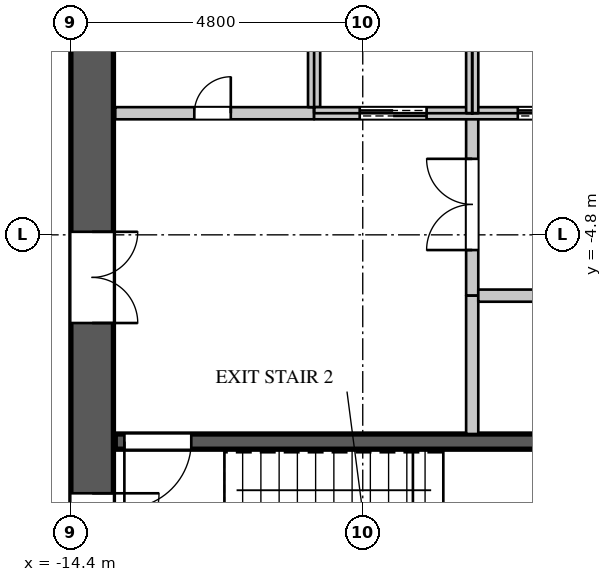
"""IFC4 building model, lengths in metres.
Left out: names, types, materials, properties, quantities, classifications, styles, units other than length and angle.
Written with IfcOpenShell. Run it as: python <this file> out.ifc"""

import sys

from ifc_helpers import new_model, si_unit, direction, frame, frame_2d, origin, place, context, subcontext, project, spatial, rectangle, extrude, element, fill, save


model = new_model("IFC4")
c1 = context("Model", 3, precision=1e-05, world=origin(), true_north=direction((0.0, 1.0)))
c2 = subcontext(c1, "Body", "Model", "MODEL_VIEW")
j1 = project(units=[si_unit("LENGTHUNIT", "METRE"), si_unit("PLANEANGLEUNIT", "RADIAN")], contexts=[c1])
p1 = place(None, origin())
s1 = spatial("IfcSite", under=j1, at=p1, CompositionType="ELEMENT")
p2 = place(p1, origin())
s2 = spatial("IfcBuilding", under=s1, at=p2, CompositionType="ELEMENT")
p3 = place(p2, frame((0.0, 0.0, 174.9)))
s3 = spatial("IfcBuildingStorey", under=s2, at=p3, CompositionType="ELEMENT", Elevation=174.9)
p4 = place(p3, frame((-14.05, -11.3, 0.0), z_axis=(0.0, 0.0, 1.0), x_axis=(0.0, 1.0, 0.0)))
e1 = element("IfcWall", 1, at=p4, inside=s3, PredefinedType="SHEAR", context=c2, shape_type="SweptSolid", body=[
    extrude(rectangle(XDim=22.6, YDim=0.7, at=frame_2d((11.3, 0.0))), origin(), (0.0, 0.0, 1.0), 4.2),
])
p5 = place(p4, frame((20.35, 0.0, 0.0)))
e2 = element("IfcOpeningElement", 2, at=p5, cuts=e1, PredefinedType="OPENING", context=c2, shape_type="SweptSolid", body=[
    extrude(rectangle(XDim=1.1, YDim=2.2, at=frame_2d((0.55, 1.1))), frame((0.0, 0.36, 0.0), z_axis=(0.0, -1.0, 0.0), x_axis=(1.0, 0.0, 0.0)), (0.0, 0.0, 1.0), 0.72),
])
p6 = place(p4, frame((1.15, 0.0, 0.0)))
e3 = element("IfcOpeningElement", 3, at=p6, cuts=e1, PredefinedType="OPENING", context=c2, shape_type="SweptSolid", body=[
    extrude(rectangle(XDim=1.1, YDim=2.2, at=frame_2d((0.55, 1.1))), frame((0.0, 0.36, 0.0), z_axis=(0.0, -1.0, 0.0), x_axis=(1.0, 0.0, 0.0)), (0.0, 0.0, 1.0), 0.72),
])
p7 = place(p4, frame((16.05, 0.0, 0.0)))
e4 = element("IfcOpeningElement", 4, at=p7, cuts=e1, PredefinedType="OPENING", context=c2, shape_type="SweptSolid", body=[
    extrude(rectangle(XDim=1.5, YDim=2.4, at=frame_2d((0.75, 1.2))), frame((0.0, 0.36, 0.0), z_axis=(0.0, -1.0, 0.0), x_axis=(1.0, 0.0, 0.0)), (0.0, 0.0, 1.0), 0.72),
])
p8 = place(p4, frame((5.05, 0.0, 0.0)))
e5 = element("IfcOpeningElement", 5, at=p8, cuts=e1, PredefinedType="OPENING", context=c2, shape_type="SweptSolid", body=[
    extrude(rectangle(XDim=1.5, YDim=2.4, at=frame_2d((0.75, 1.2))), frame((0.0, 0.36, 0.0), z_axis=(0.0, -1.0, 0.0), x_axis=(1.0, 0.0, 0.0)), (0.0, 0.0, 1.0), 0.72),
])
p9 = place(p3, frame((-7.8, -5.8, 0.0), z_axis=(0.0, 0.0, 1.0), x_axis=(0.0, 1.0, 0.0)))
e6 = element("IfcWall", 6, at=p9, inside=s3, PredefinedType="PARTITIONING", context=c2, shape_type="SweptSolid", body=[
    extrude(rectangle(XDim=3.0, YDim=0.2, at=frame_2d((1.5, 0.0))), origin(), (0.0, 0.0, 1.0), 3.95),
])
p10 = place(p9, frame((0.75, 0.0, 0.0)))
e7 = element("IfcOpeningElement", 7, at=p10, cuts=e6, PredefinedType="OPENING", context=c2, shape_type="SweptSolid", body=[
    extrude(rectangle(XDim=1.5, YDim=2.4, at=frame_2d((0.75, 1.2))), frame((0.0, 0.11, 0.0), z_axis=(0.0, -1.0, 0.0), x_axis=(1.0, 0.0, 0.0)), (0.0, 0.0, 1.0), 0.22),
])
p11 = place(p3, frame((-13.67, -2.8, 0.0), z_axis=(0.0, 0.0, 1.0), x_axis=(1.0, 0.0, 0.0)))
e8 = element("IfcWall", 8, at=p11, inside=s3, PredefinedType="PARTITIONING", context=c2, shape_type="SweptSolid", body=[
    extrude(rectangle(XDim=3.27, YDim=0.2, at=frame_2d((1.635, 0.0))), origin(), (0.0, 0.0, 1.0), 3.95),
])
p12 = place(p11, frame((1.3, 0.0, 0.0)))
e9 = element("IfcOpeningElement", 9, at=p12, cuts=e8, PredefinedType="OPENING", context=c2, shape_type="SweptSolid", body=[
    extrude(rectangle(XDim=0.6, YDim=2.0, at=frame_2d((0.3, 1.0))), frame((0.0, 0.11, 0.0), z_axis=(0.0, -1.0, 0.0), x_axis=(1.0, 0.0, 0.0)), (0.0, 0.0, 1.0), 0.22),
])
p13 = place(p3, frame((-7.8, -8.075, 0.0), z_axis=(0.0, 0.0, 1.0), x_axis=(0.0, 1.0, 0.0)))
e10 = element("IfcWall", 10, at=p13, inside=s3, PredefinedType="PARTITIONING", context=c2, shape_type="SweptSolid", body=[
    extrude(rectangle(XDim=2.275, YDim=0.2, at=frame_2d((1.137, 0.0))), origin(), (0.0, 0.0, 1.0), 3.95),
])
p14 = place(p3, frame((-7.7, -5.8, 0.0), z_axis=(0.0, 0.0, 1.0), x_axis=(1.0, 0.0, 0.0)))
e11 = element("IfcWall", 11, at=p14, inside=s3, PredefinedType="PARTITIONING", context=c2, shape_type="SweptSolid", body=[
    extrude(rectangle(XDim=3.68, YDim=0.2, at=frame_2d((1.84, 0.0))), origin(), (0.0, 0.0, 1.0), 3.95),
])
p15 = place(p14, frame((1.35, 0.0, 0.0)))
e12 = element("IfcOpeningElement", 12, at=p15, cuts=e11, PredefinedType="OPENING", context=c2, shape_type="SweptSolid", body=[
    extrude(rectangle(XDim=0.9, YDim=2.2, at=frame_2d((0.45, 1.1))), frame((0.0, 0.11, 0.0), z_axis=(0.0, -1.0, 0.0), x_axis=(1.0, 0.0, 0.0)), (0.0, 0.0, 1.0), 0.22),
])
p16 = place(p3, frame((-10.4, -2.7, 0.0), z_axis=(0.0, 0.0, 1.0), x_axis=(0.0, 1.0, 0.0)))
e13 = element("IfcWall", 13, at=p16, inside=s3, PredefinedType="PARTITIONING", context=c2, shape_type="SweptSolid", body=[
    extrude(rectangle(XDim=2.7, YDim=0.2, at=frame_2d((1.35, 0.0))), origin(), (0.0, 0.0, 1.0), 3.95),
])
p17 = place(p3, frame((-10.4, -2.8, 0.0), z_axis=(0.0, 0.0, 1.0), x_axis=(1.0, 0.0, 0.0)))
e14 = element("IfcWall", 14, at=p17, inside=s3, PredefinedType="PARTITIONING", context=c2, shape_type="SweptSolid", body=[
    extrude(rectangle(XDim=18.2, YDim=0.2, at=frame_2d((9.1, 0.0))), origin(), (0.0, 0.0, 1.0), 3.95),
])
p18 = place(p17, frame((0.75, 0.0, 0.0)))
e15 = element("IfcOpeningElement", 15, at=p18, cuts=e14, PredefinedType="OPENING", context=c2, shape_type="SweptSolid", body=[
    extrude(rectangle(XDim=1.1, YDim=2.2, at=frame_2d((0.55, 1.1))), frame((0.0, 0.11, 0.0), z_axis=(0.0, -1.0, 0.0), x_axis=(1.0, 0.0, 0.0)), (0.0, 0.0, 1.0), 0.22),
])
p19 = place(p17, frame((3.35, 0.0, 0.0)))
e16 = element("IfcOpeningElement", 16, at=p19, cuts=e14, PredefinedType="OPENING", context=c2, shape_type="SweptSolid", body=[
    extrude(rectangle(XDim=1.1, YDim=2.2, at=frame_2d((0.55, 1.1))), frame((0.0, 0.11, 0.0), z_axis=(0.0, -1.0, 0.0), x_axis=(1.0, 0.0, 0.0)), (0.0, 0.0, 1.0), 0.22),
])
p20 = place(p17, frame((5.95, 0.0, 0.0)))
e17 = element("IfcOpeningElement", 17, at=p20, cuts=e14, PredefinedType="OPENING", context=c2, shape_type="SweptSolid", body=[
    extrude(rectangle(XDim=1.1, YDim=2.2, at=frame_2d((0.55, 1.1))), frame((0.0, 0.11, 0.0), z_axis=(0.0, -1.0, 0.0), x_axis=(1.0, 0.0, 0.0)), (0.0, 0.0, 1.0), 0.22),
])
p21 = place(p17, frame((8.55, 0.0, 0.0)))
e18 = element("IfcOpeningElement", 18, at=p21, cuts=e14, PredefinedType="OPENING", context=c2, shape_type="SweptSolid", body=[
    extrude(rectangle(XDim=1.1, YDim=2.2, at=frame_2d((0.55, 1.1))), frame((0.0, 0.11, 0.0), z_axis=(0.0, -1.0, 0.0), x_axis=(1.0, 0.0, 0.0)), (0.0, 0.0, 1.0), 0.22),
])
p22 = place(p17, frame((11.15, 0.0, 0.0)))
e19 = element("IfcOpeningElement", 19, at=p22, cuts=e14, PredefinedType="OPENING", context=c2, shape_type="SweptSolid", body=[
    extrude(rectangle(XDim=1.1, YDim=2.2, at=frame_2d((0.55, 1.1))), frame((0.0, 0.11, 0.0), z_axis=(0.0, -1.0, 0.0), x_axis=(1.0, 0.0, 0.0)), (0.0, 0.0, 1.0), 0.22),
])
p23 = place(p17, frame((13.75, 0.0, 0.0)))
e20 = element("IfcOpeningElement", 20, at=p23, cuts=e14, PredefinedType="OPENING", context=c2, shape_type="SweptSolid", body=[
    extrude(rectangle(XDim=1.1, YDim=2.2, at=frame_2d((0.55, 1.1))), frame((0.0, 0.11, 0.0), z_axis=(0.0, -1.0, 0.0), x_axis=(1.0, 0.0, 0.0)), (0.0, 0.0, 1.0), 0.22),
])
p24 = place(p17, frame((16.35, 0.0, 0.0)))
e21 = element("IfcOpeningElement", 21, at=p24, cuts=e14, PredefinedType="OPENING", context=c2, shape_type="SweptSolid", body=[
    extrude(rectangle(XDim=1.1, YDim=2.2, at=frame_2d((0.55, 1.1))), frame((0.0, 0.11, 0.0), z_axis=(0.0, -1.0, 0.0), x_axis=(1.0, 0.0, 0.0)), (0.0, 0.0, 1.0), 0.22),
])
p25 = place(p3, frame((-7.8, -2.8, 0.0), z_axis=(0.0, 0.0, 1.0), x_axis=(0.0, 1.0, 0.0)))
e22 = element("IfcWall", 22, at=p25, inside=s3, PredefinedType="PARTITIONING", context=c2, shape_type="SweptSolid", body=[
    extrude(rectangle(XDim=2.8, YDim=0.2, at=frame_2d((1.4, 0.0))), origin(), (0.0, 0.0, 1.0), 3.95),
])
p26 = place(p3, frame((-13.67, -8.2, 0.0), z_axis=(0.0, 0.0, 1.0), x_axis=(1.0, 0.0, 0.0)))
e23 = element("IfcWall", 23, at=p26, inside=s3, PredefinedType="SHEAR", context=c2, shape_type="SweptSolid", body=[
    extrude(rectangle(XDim=8.395, YDim=0.25, at=frame_2d((4.198, 0.0))), origin(), (0.0, 0.0, 1.0), 3.95),
])
p27 = place(p26, frame((0.15, 0.0, 0.0)))
e24 = element("IfcOpeningElement", 24, at=p27, cuts=e23, PredefinedType="OPENING", context=c2, shape_type="SweptSolid", body=[
    extrude(rectangle(XDim=1.1, YDim=2.2, at=frame_2d((0.55, 1.1))), frame((0.0, 0.135, 0.0), z_axis=(0.0, -1.0, 0.0), x_axis=(1.0, 0.0, 0.0)), (0.0, 0.0, 1.0), 0.27),
])
p28 = place(p12, origin())
e25 = element("IfcDoor", 25, at=p28, inside=s3, OperationType="SINGLE_SWING_RIGHT", PredefinedType="DOOR", context=c2, shape_type="SweptSolid", body=[
    extrude(rectangle(XDim=0.6, YDim=2.0, at=frame_2d((0.3, 1.0))), frame((0.0, 0.025, 0.0), z_axis=(0.0, -1.0, 0.0), x_axis=(1.0, 0.0, 0.0)), (0.0, 0.0, 1.0), 0.05),
])
fill(e9, e25)
p29 = place(p18, origin())
e26 = element("IfcDoor", 26, at=p29, inside=s3, OperationType="DOUBLE_DOOR_SLIDING", PredefinedType="DOOR", context=c2, shape_type="SweptSolid", body=[
    extrude(rectangle(XDim=1.1, YDim=2.2, at=frame_2d((0.55, 1.1))), frame((0.0, 0.025, 0.0), z_axis=(0.0, -1.0, 0.0), x_axis=(1.0, 0.0, 0.0)), (0.0, 0.0, 1.0), 0.05),
])
fill(e15, e26)
p30 = place(p19, origin())
e27 = element("IfcDoor", 27, at=p30, inside=s3, OperationType="DOUBLE_DOOR_SLIDING", PredefinedType="DOOR", context=c2, shape_type="SweptSolid", body=[
    extrude(rectangle(XDim=1.1, YDim=2.2, at=frame_2d((0.55, 1.1))), frame((0.0, 0.025, 0.0), z_axis=(0.0, -1.0, 0.0), x_axis=(1.0, 0.0, 0.0)), (0.0, 0.0, 1.0), 0.05),
])
fill(e16, e27)
p31 = place(p27, origin())
e28 = element("IfcDoor", 28, at=p31, inside=s3, OperationType="SINGLE_SWING_RIGHT", PredefinedType="DOOR", context=c2, shape_type="SweptSolid", body=[
    extrude(rectangle(XDim=1.1, YDim=2.2, at=frame_2d((0.55, 1.1))), frame((0.0, 0.025, 0.0), z_axis=(0.0, -1.0, 0.0), x_axis=(1.0, 0.0, 0.0)), (0.0, 0.0, 1.0), 0.05),
])
fill(e24, e28)
p32 = place(p10, origin())
e29 = element("IfcDoor", 29, at=p32, inside=s3, OperationType="DOUBLE_DOOR_SINGLE_SWING", PredefinedType="DOOR", context=c2, shape_type="SweptSolid", body=[
    extrude(rectangle(XDim=1.5, YDim=2.4, at=frame_2d((0.75, 1.2))), frame((0.0, 0.025, 0.0), z_axis=(0.0, -1.0, 0.0), x_axis=(1.0, 0.0, 0.0)), (0.0, 0.0, 1.0), 0.05),
])
fill(e7, e29)
p33 = place(p6, origin())
e30 = element("IfcDoor", 30, at=p33, inside=s3, OperationType="SINGLE_SWING_LEFT", PredefinedType="DOOR", context=c2, shape_type="SweptSolid", body=[
    extrude(rectangle(XDim=1.1, YDim=2.2, at=frame_2d((0.55, 1.1))), frame((0.0, -0.295, 0.0), z_axis=(0.0, -1.0, 0.0), x_axis=(1.0, 0.0, 0.0)), (0.0, 0.0, 1.0), 0.05),
])
fill(e3, e30)
p34 = place(p8, origin())
e31 = element("IfcDoor", 31, at=p34, inside=s3, OperationType="DOUBLE_DOOR_SINGLE_SWING", PredefinedType="DOOR", context=c2, shape_type="SweptSolid", body=[
    extrude(rectangle(XDim=1.5, YDim=2.4, at=frame_2d((0.75, 1.2))), frame((0.0, -0.295, 0.0), z_axis=(0.0, -1.0, 0.0), x_axis=(1.0, 0.0, 0.0)), (0.0, 0.0, 1.0), 0.05),
])
fill(e5, e31)
save(model, sys.argv[1])
